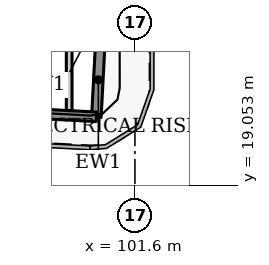
"""IFC4 building model, lengths in metres.
Left out: names, types, materials, properties, quantities, classifications, styles, units other than length and angle.
Written with IfcOpenShell. Run it as: python <this file> out.ifc"""

import sys

from ifc_helpers import new_model, si_unit, direction, frame, frame_2d, origin, place, context, subcontext, project, spatial, rectangle, extrude, element, save


model = new_model("IFC4")
c1 = context("Model", 3, precision=1e-05, world=origin(), true_north=direction((0.0, 1.0)))
c2 = subcontext(c1, "Body", "Model", "MODEL_VIEW")
j1 = project(units=[si_unit("LENGTHUNIT", "METRE"), si_unit("PLANEANGLEUNIT", "RADIAN")], contexts=[c1])
p1 = place(None, origin())
s1 = spatial("IfcSite", under=j1, at=p1, CompositionType="ELEMENT")
p2 = place(p1, origin())
s2 = spatial("IfcBuilding", under=s1, at=p2, CompositionType="ELEMENT")
p3 = place(p2, frame((0.0, 0.0, 61.7)))
s3 = spatial("IfcBuildingStorey", under=s2, at=p3, CompositionType="ELEMENT", Elevation=61.7)
p4 = place(p3, frame((100.689, 22.797, 0.0), z_axis=(0.0, 0.0, 1.0), x_axis=(-0.052841433274, -0.998602915542, 0.0)))
e1 = element("IfcWall", 1, at=p4, inside=s3, PredefinedType="SOLIDWALL", context=c2, shape_type="SweptSolid", body=[
    extrude(rectangle(XDim=1.95, YDim=0.25, at=frame_2d((0.975, 0.0))), origin(), (0.0, 0.0, 1.0), 3.75),
])
p5 = place(p3, frame((100.586, 20.85, 0.0), z_axis=(0.0, 0.0, 1.0), x_axis=(-0.99861746497, 0.052565755559, 0.0)))
e2 = element("IfcWall", 2, at=p5, inside=s3, PredefinedType="SOLIDWALL", context=c2, shape_type="SweptSolid", body=[
    extrude(rectangle(XDim=66.639, YDim=0.25, at=frame_2d((33.319, 0.0))), origin(), (0.0, 0.0, 1.0), 3.75),
])
p6 = place(p3, frame((99.87, 21.015, 0.0), z_axis=(0.0, 0.0, 1.0), x_axis=(0.0, 1.0, 0.0)))
e3 = element("IfcWall", 3, at=p6, inside=s3, PredefinedType="PARTITIONING", context=c2, shape_type="SweptSolid", body=[
    extrude(rectangle(XDim=7.285, YDim=0.15, at=frame_2d((3.643, 0.0))), origin(), (0.0, 0.0, 1.0), 3.9),
])
save(model, sys.argv[1])
